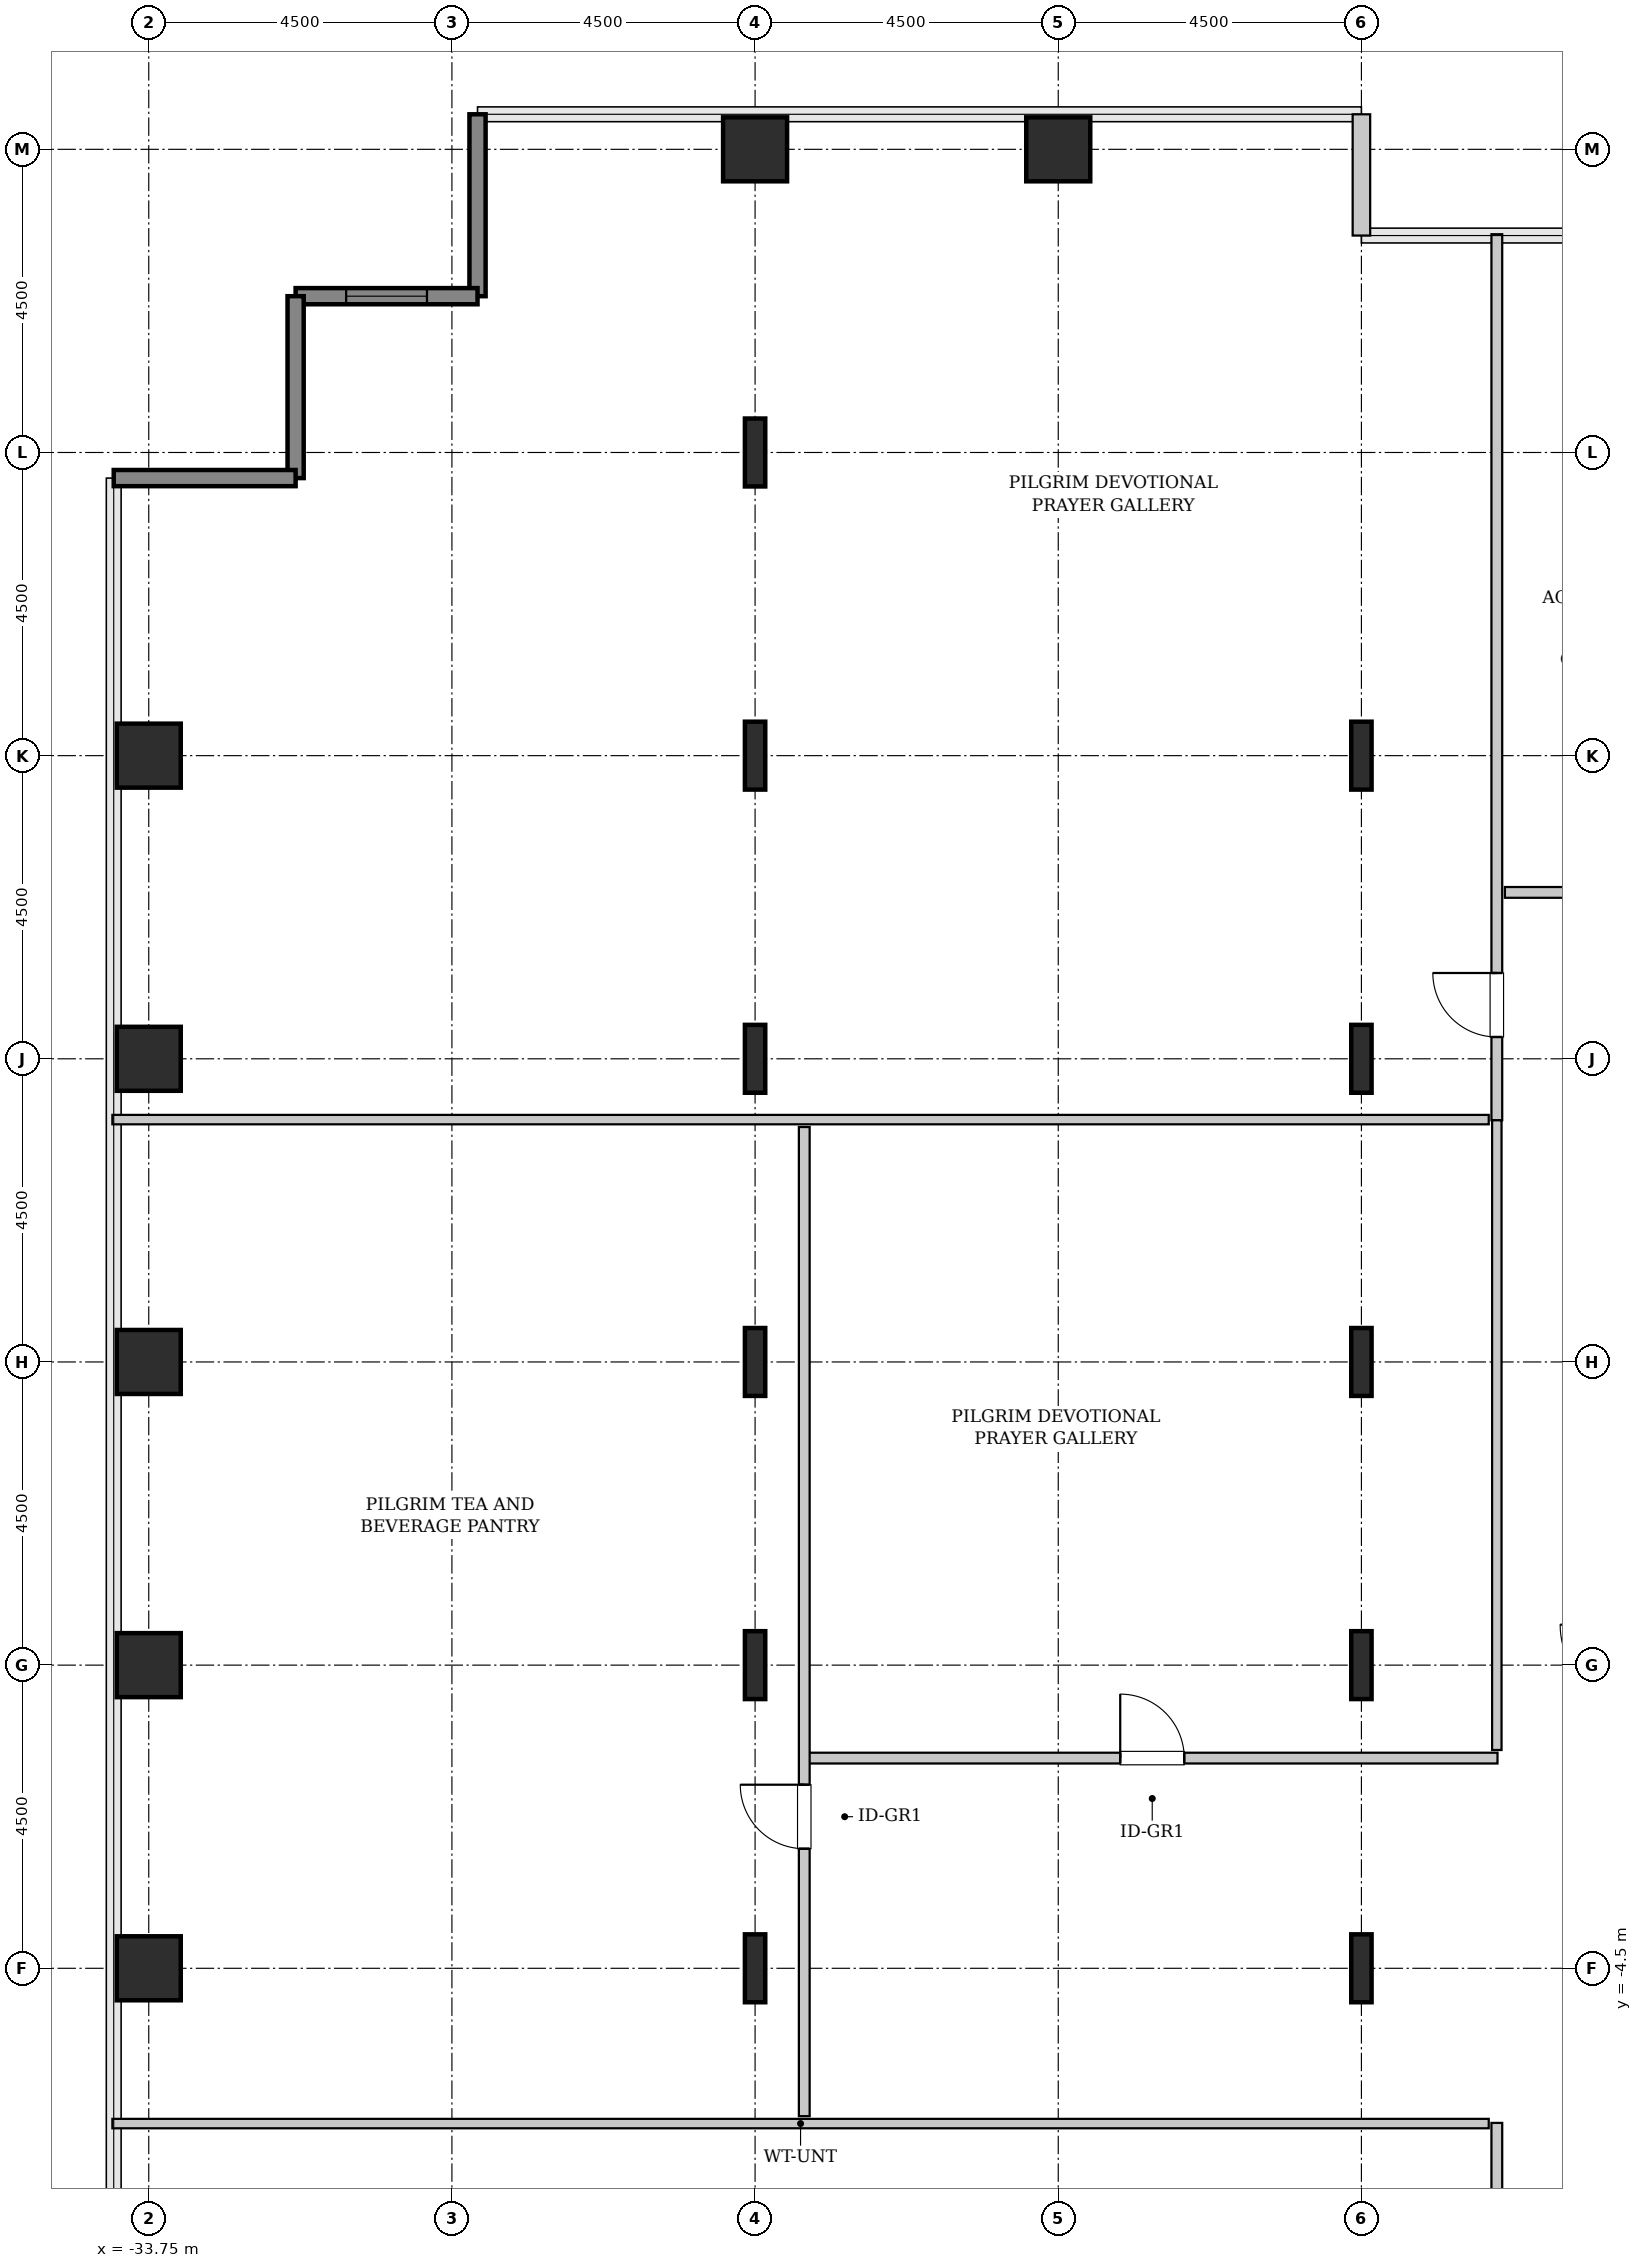
"""IFC4 building model, lengths in metres.
Left out: names, types, materials, properties, quantities, classifications, styles, units other than length and angle.
Written with IfcOpenShell. Run it as: python <this file> out.ifc"""

import sys

from ifc_helpers import new_model, si_unit, direction, frame, frame_2d, origin, origin_2d, place, context, subcontext, project, spatial, rectangle, hollow_rectangle, i_section, extrude, source, transform, mapped, element, fill, save


model = new_model("IFC4")
c1 = context("Model", 3, precision=1e-05, world=origin(), true_north=direction((0.0, 1.0)))
c2 = subcontext(c1, "Body", "Model", "MODEL_VIEW")
j1 = project(units=[si_unit("LENGTHUNIT", "METRE"), si_unit("PLANEANGLEUNIT", "RADIAN")], contexts=[c1])
p1 = place(None, origin())
s1 = spatial("IfcSite", under=j1, at=p1, CompositionType="ELEMENT")
p2 = place(p1, origin())
s2 = spatial("IfcBuilding", under=s1, at=p2, CompositionType="ELEMENT")
p3 = place(p2, frame((0.0, 0.0, 82.4)))
s3 = spatial("IfcBuildingStorey", under=s2, at=p3, CompositionType="ELEMENT", Elevation=82.4)
m1 = source(origin(), c2, "Body", "SweptSolid", [
    extrude(hollow_rectangle(XDim=0.95, YDim=0.95, WallThickness=0.045, InnerFilletRadius=0.045, OuterFilletRadius=0.09, at=origin_2d()), origin(), (0.0, 0.0, 1.0), 3.8),
])
for number, where, z_axis, x_axis in (
    (1, (-33.75, -4.5, 0.0), (0.0, 0.0, 1.0), (1.0, 0.0, 0.0)),
    (2, (-33.75, 0.0, 0.0), (0.0, 0.0, 1.0), (1.0, 0.0, 0.0)),
    (3, (-33.75, 4.5, 0.0), (0.0, 0.0, 1.0), (1.0, 0.0, 0.0)),
    (4, (-33.75, 9.0, 0.0), (0.0, 0.0, 1.0), (1.0, 0.0, 0.0)),
    (5, (-33.75, 13.5, 0.0), (0.0, 0.0, 1.0), (1.0, 0.0, 0.0)),
):
    element("IfcColumn", number, at=place(p3, frame(where, z_axis=z_axis, x_axis=x_axis)), inside=s3, PredefinedType="COLUMN", context=c2, shape_type="MappedRepresentation", body=[
        mapped(m1, transform((0.0, 0.0, 0.0), x_axis=(1.0, 0.0, 0.0), y_axis=(0.0, 1.0, 0.0), z_axis=(0.0, 0.0, 1.0), scale=1.0)),
    ])
m2 = source(origin(), c2, "Body", "SweptSolid", [
    extrude(i_section(OverallWidth=0.302, OverallDepth=1.008, WebThickness=0.021, FlangeThickness=0.04, FilletRadius=0.03, at=origin_2d()), origin(), (0.0, 0.0, 1.0), 3.8),
])
for number, where, z_axis, x_axis in (
    (6, (-24.75, -4.5, 0.0), (0.0, 0.0, 1.0), (1.0, 0.0, 0.0)),
    (7, (-24.75, 0.0, 0.0), (0.0, 0.0, 1.0), (1.0, 0.0, 0.0)),
    (8, (-24.75, 4.5, 0.0), (0.0, 0.0, 1.0), (1.0, 0.0, 0.0)),
    (9, (-24.75, 9.0, 0.0), (0.0, 0.0, 1.0), (1.0, 0.0, 0.0)),
    (10, (-24.75, 13.5, 0.0), (0.0, 0.0, 1.0), (1.0, 0.0, 0.0)),
    (11, (-24.75, 18.0, 0.0), (0.0, 0.0, 1.0), (1.0, 0.0, 0.0)),
):
    element("IfcColumn", number, at=place(p3, frame(where, z_axis=z_axis, x_axis=x_axis)), inside=s3, PredefinedType="COLUMN", context=c2, shape_type="MappedRepresentation", body=[
        mapped(m2, transform((0.0, 0.0, 0.0), x_axis=(1.0, 0.0, 0.0), y_axis=(0.0, 1.0, 0.0), z_axis=(0.0, 0.0, 1.0), scale=1.0)),
    ])
for number, where, z_axis, x_axis in (
    (12, (-24.75, 22.5, 0.0), (0.0, 0.0, 1.0), (1.0, 0.0, 0.0)),
    (13, (-20.25, 22.5, 0.0), (0.0, 0.0, 1.0), (1.0, 0.0, 0.0)),
):
    element("IfcColumn", number, at=place(p3, frame(where, z_axis=z_axis, x_axis=x_axis)), inside=s3, PredefinedType="COLUMN", context=c2, shape_type="MappedRepresentation", body=[
        mapped(m1, transform((0.0, 0.0, 0.0), x_axis=(1.0, 0.0, 0.0), y_axis=(0.0, 1.0, 0.0), z_axis=(0.0, 0.0, 1.0), scale=1.0)),
    ])
for number, where, z_axis, x_axis in (
    (14, (-15.75, -4.5, 0.0), (0.0, 0.0, 1.0), (1.0, 0.0, 0.0)),
    (15, (-15.75, 0.0, 0.0), (0.0, 0.0, 1.0), (1.0, 0.0, 0.0)),
    (16, (-15.75, 4.5, 0.0), (0.0, 0.0, 1.0), (1.0, 0.0, 0.0)),
    (17, (-15.75, 9.0, 0.0), (0.0, 0.0, 1.0), (1.0, 0.0, 0.0)),
    (18, (-15.75, 13.5, 0.0), (0.0, 0.0, 1.0), (1.0, 0.0, 0.0)),
):
    element("IfcColumn", number, at=place(p3, frame(where, z_axis=z_axis, x_axis=x_axis)), inside=s3, PredefinedType="COLUMN", context=c2, shape_type="MappedRepresentation", body=[
        mapped(m2, transform((0.0, 0.0, 0.0), x_axis=(1.0, 0.0, 0.0), y_axis=(0.0, 1.0, 0.0), z_axis=(0.0, 0.0, 1.0), scale=1.0)),
    ])
m3 = source(origin(), c2, "Body", "SweptSolid", [
    extrude(rectangle(XDim=1.8, YDim=0.26, at=frame_2d((0.9, 0.0))), origin(), (0.0, 0.0, 1.0), 3.5),
])
p4 = place(p3, frame((-15.75, 21.22, 0.0), z_axis=(0.0, 0.0, 1.0), x_axis=(0.0, 1.0, 0.0)))
e19 = element("IfcWall", 19, at=p4, inside=s3, PredefinedType="SOLIDWALL", context=c2, shape_type="MappedRepresentation", body=[
    mapped(m3, transform((0.0, 0.0, 0.0), x_axis=(1.0, 0.0, 0.0), y_axis=(0.0, 1.0, 0.0), z_axis=(0.0, 0.0, 1.0), scale=1.0)),
])
m4 = source(origin(), c2, "Body", "SweptSolid", [
    extrude(rectangle(XDim=2.7, YDim=0.24, at=frame_2d((1.35, 0.0))), origin(), (0.0, 0.0, 1.0), 3.5),
])
p5 = place(p3, frame((-28.87, 23.02, 0.0), z_axis=(0.0, 0.0, 1.0), x_axis=(0.0, -1.0, 0.0)))
e20 = element("IfcWall", 20, at=p5, inside=s3, PredefinedType="SHEAR", context=c2, shape_type="MappedRepresentation", body=[
    mapped(m4, transform((0.0, 0.0, 0.0), x_axis=(1.0, 0.0, 0.0), y_axis=(0.0, 1.0, 0.0), z_axis=(0.0, 0.0, 1.0), scale=1.0)),
])
p6 = place(p3, frame((-28.87, 20.32, 0.0), z_axis=(0.0, 0.0, 1.0), x_axis=(-1.0, 0.0, 0.0)))
e21 = element("IfcWall", 21, at=p6, inside=s3, PredefinedType="SHEAR", context=c2, shape_type="MappedRepresentation", body=[
    mapped(m4, transform((0.0, 0.0, 0.0), x_axis=(1.0, 0.0, 0.0), y_axis=(0.0, 1.0, 0.0), z_axis=(0.0, 0.0, 1.0), scale=1.0)),
])
p7 = place(p6, frame((0.75, 0.0, 0.85)))
e22 = element("IfcOpeningElement", 22, at=p7, cuts=e21, PredefinedType="OPENING", context=c2, shape_type="SweptSolid", body=[
    extrude(rectangle(XDim=1.2, YDim=1.8, at=frame_2d((0.6, 0.9))), frame((0.0, 0.13, 0.0), z_axis=(0.0, -1.0, 0.0), x_axis=(1.0, 0.0, 0.0)), (0.0, 0.0, 1.0), 0.26),
])
for number, where, z_axis, x_axis in (
    (23, (-31.57, 20.32, 0.0), (0.0, 0.0, 1.0), (0.0, -1.0, 0.0)),
    (24, (-31.57, 17.62, 0.0), (0.0, 0.0, 1.0), (-1.0, 0.0, 0.0)),
):
    element("IfcWall", number, at=place(p3, frame(where, z_axis=z_axis, x_axis=x_axis)), inside=s3, PredefinedType="SHEAR", context=c2, shape_type="MappedRepresentation", body=[
        mapped(m4, transform((0.0, 0.0, 0.0), x_axis=(1.0, 0.0, 0.0), y_axis=(0.0, 1.0, 0.0), z_axis=(0.0, 0.0, 1.0), scale=1.0)),
    ])
m5 = source(origin(), c2, "Body", "SweptSolid", [
    extrude(rectangle(XDim=14.445, YDim=0.16, at=frame_2d((7.223, 0.0))), origin(), (0.0, 0.0, 1.0), 3.485),
])
p8 = place(p3, frame((-13.74, -21.24, 0.0), z_axis=(0.0, 0.0, 1.0), x_axis=(0.0, 1.0, 0.0)))
e25 = element("IfcWall", 25, at=p8, inside=s3, PredefinedType="PARTITIONING", context=c2, shape_type="MappedRepresentation", body=[
    mapped(m5, transform((0.0, 0.0, 0.0), x_axis=(1.0, 0.0, 0.0), y_axis=(0.0, 1.0, 0.0), z_axis=(0.0, 0.0, 1.0), scale=1.0)),
])
p9 = place(p8, frame((11.613, 0.0, 0.0)))
e26 = element("IfcOpeningElement", 26, at=p9, cuts=e25, PredefinedType="OPENING", context=c2, shape_type="SweptSolid", body=[
    extrude(rectangle(XDim=0.95, YDim=2.1, at=frame_2d((0.475, 1.05))), frame((0.0, 0.09, 0.0), z_axis=(0.0, -1.0, 0.0), x_axis=(1.0, 0.0, 0.0)), (0.0, 0.0, 1.0), 0.18),
])
m6 = source(origin(), c2, "Body", "SweptSolid", [
    extrude(rectangle(XDim=20.43, YDim=0.14, at=frame_2d((10.215, 0.0))), origin(), (0.0, 0.0, 1.0), 3.485),
])
p10 = place(p3, frame((-34.29, -6.805, 0.0), z_axis=(0.0, 0.0, 1.0), x_axis=(1.0, 0.0, 0.0)))
e27 = element("IfcWall", 27, at=p10, inside=s3, PredefinedType="PARTITIONING", context=c2, shape_type="MappedRepresentation", body=[
    mapped(m6, transform((0.0, 0.0, 0.0), x_axis=(1.0, 0.0, 0.0), y_axis=(0.0, 1.0, 0.0), z_axis=(0.0, 0.0, 1.0), scale=1.0)),
])
m7 = source(origin(), c2, "Body", "SweptSolid", [
    extrude(rectangle(XDim=13.153, YDim=0.16, at=frame_2d((6.576, 0.0))), origin(), (0.0, 0.0, 1.0), 3.485),
])
p11 = place(p3, frame((-13.74, 8.087, 0.0), z_axis=(0.0, 0.0, 1.0), x_axis=(0.0, 1.0, 0.0)))
e28 = element("IfcWall", 28, at=p11, inside=s3, PredefinedType="PARTITIONING", context=c2, shape_type="MappedRepresentation", body=[
    mapped(m7, transform((0.0, 0.0, 0.0), x_axis=(1.0, 0.0, 0.0), y_axis=(0.0, 1.0, 0.0), z_axis=(0.0, 0.0, 1.0), scale=1.0)),
])
p12 = place(p11, frame((1.236, 0.0, 0.0)))
e29 = element("IfcOpeningElement", 29, at=p12, cuts=e28, PredefinedType="OPENING", context=c2, shape_type="SweptSolid", body=[
    extrude(rectangle(XDim=0.95, YDim=2.1, at=frame_2d((0.475, 1.05))), frame((0.0, 0.09, 0.0), z_axis=(0.0, -1.0, 0.0), x_axis=(1.0, 0.0, 0.0)), (0.0, 0.0, 1.0), 0.18),
])
p13 = place(p3, frame((-34.29, 8.097, 0.0), z_axis=(0.0, 0.0, 1.0), x_axis=(1.0, 0.0, 0.0)))
e30 = element("IfcWall", 30, at=p13, inside=s3, PredefinedType="PARTITIONING", context=c2, shape_type="MappedRepresentation", body=[
    mapped(m6, transform((0.0, 0.0, 0.0), x_axis=(1.0, 0.0, 0.0), y_axis=(0.0, 1.0, 0.0), z_axis=(0.0, 0.0, 1.0), scale=1.0)),
])
m8 = source(origin(), c2, "Body", "SweptSolid", [
    extrude(rectangle(XDim=10.25, YDim=0.16, at=frame_2d((5.125, 0.0))), origin(), (0.0, 0.0, 1.0), 3.485),
])
p14 = place(p3, frame((-23.98, -1.38, 0.0), z_axis=(0.0, 0.0, 1.0), x_axis=(1.0, 0.0, 0.0)))
e31 = element("IfcWall", 31, at=p14, inside=s3, PredefinedType="PARTITIONING", context=c2, shape_type="MappedRepresentation", body=[
    mapped(m8, transform((0.0, 0.0, 0.0), x_axis=(1.0, 0.0, 0.0), y_axis=(0.0, 1.0, 0.0), z_axis=(0.0, 0.0, 1.0), scale=1.0)),
])
p15 = place(p14, frame((4.65, 0.0, 0.0)))
e32 = element("IfcOpeningElement", 32, at=p15, cuts=e31, PredefinedType="OPENING", context=c2, shape_type="SweptSolid", body=[
    extrude(rectangle(XDim=0.95, YDim=2.1, at=frame_2d((0.475, 1.05))), frame((0.0, 0.09, 0.0), z_axis=(0.0, -1.0, 0.0), x_axis=(1.0, 0.0, 0.0)), (0.0, 0.0, 1.0), 0.18),
])
m9 = source(origin(), c2, "Body", "SweptSolid", [
    extrude(rectangle(XDim=9.347, YDim=0.14, at=frame_2d((4.674, 0.0))), origin(), (0.0, 0.0, 1.0), 3.485),
])
p16 = place(p3, frame((-13.74, -1.26, 0.0), z_axis=(0.0, 0.0, 1.0), x_axis=(0.0, 1.0, 0.0)))
e33 = element("IfcWall", 33, at=p16, inside=s3, PredefinedType="PARTITIONING", context=c2, shape_type="MappedRepresentation", body=[
    mapped(m9, transform((0.0, 0.0, 0.0), x_axis=(1.0, 0.0, 0.0), y_axis=(0.0, 1.0, 0.0), z_axis=(0.0, 0.0, 1.0), scale=1.0)),
])
m10 = source(origin(), c2, "Body", "SweptSolid", [
    extrude(rectangle(XDim=14.683, YDim=0.16, at=frame_2d((7.341, 0.0))), origin(), (0.0, 0.0, 1.0), 3.485),
])
p17 = place(p3, frame((-24.02, -6.695, 0.0), z_axis=(0.0, 0.0, 1.0), x_axis=(0.0, 1.0, 0.0)))
e34 = element("IfcWall", 34, at=p17, inside=s3, PredefinedType="PARTITIONING", context=c2, shape_type="MappedRepresentation", body=[
    mapped(m10, transform((0.0, 0.0, 0.0), x_axis=(1.0, 0.0, 0.0), y_axis=(0.0, 1.0, 0.0), z_axis=(0.0, 0.0, 1.0), scale=1.0)),
])
p18 = place(p17, frame((3.97, 0.0, 0.0)))
e35 = element("IfcOpeningElement", 35, at=p18, cuts=e34, PredefinedType="OPENING", context=c2, shape_type="SweptSolid", body=[
    extrude(rectangle(XDim=0.95, YDim=2.1, at=frame_2d((0.475, 1.05))), frame((0.0, 0.09, 0.0), z_axis=(0.0, -1.0, 0.0), x_axis=(1.0, 0.0, 0.0)), (0.0, 0.0, 1.0), 0.18),
])
m11 = source(origin(), c2, "Body", "SweptSolid", [
    extrude(rectangle(XDim=4.125, YDim=0.16, at=frame_2d((2.062, 0.0))), origin(), (0.0, 0.0, 1.0), 3.485),
])
p19 = place(p3, frame((-13.62, 11.47, 0.0), z_axis=(0.0, 0.0, 1.0), x_axis=(1.0, 0.0, 0.0)))
e36 = element("IfcWall", 36, at=p19, inside=s3, PredefinedType="PARTITIONING", context=c2, shape_type="MappedRepresentation", body=[
    mapped(m11, transform((0.0, 0.0, 0.0), x_axis=(1.0, 0.0, 0.0), y_axis=(0.0, 1.0, 0.0), z_axis=(0.0, 0.0, 1.0), scale=1.0)),
])
p20 = place(p19, frame((1.587, 0.0, 0.0)))
e37 = element("IfcOpeningElement", 37, at=p20, cuts=e36, PredefinedType="OPENING", context=c2, shape_type="SweptSolid", body=[
    extrude(rectangle(XDim=0.95, YDim=2.1, at=frame_2d((0.475, 1.05))), frame((0.0, 0.09, 0.0), z_axis=(0.0, -1.0, 0.0), x_axis=(1.0, 0.0, 0.0)), (0.0, 0.0, 1.0), 0.18),
])
m12 = source(origin(), c2, "Body", "SweptSolid", [
    extrude(rectangle(XDim=1.2, YDim=1.8, at=frame_2d((0.6, 0.9))), frame((0.0, 0.03, 0.0), z_axis=(0.0, -1.0, 0.0), x_axis=(1.0, 0.0, 0.0)), (0.0, 0.0, 1.0), 0.06),
])
p21 = place(p7, origin())
e38 = element("IfcWindow", 38, at=p21, inside=s3, PartitioningType="SINGLE_PANEL", PredefinedType="WINDOW", context=c2, shape_type="MappedRepresentation", body=[
    mapped(m12, transform((0.0, 0.0, 0.0), x_axis=(1.0, 0.0, 0.0), y_axis=(0.0, 1.0, 0.0), z_axis=(0.0, 0.0, 1.0), scale=1.0)),
])
fill(e22, e38)
m13 = source(origin(), c2, "Body", "SweptSolid", [
    extrude(rectangle(XDim=0.95, YDim=2.1, at=frame_2d((0.475, 1.05))), frame((0.0, 0.025, 0.0), z_axis=(0.0, -1.0, 0.0), x_axis=(1.0, 0.0, 0.0)), (0.0, 0.0, 1.0), 0.05),
])
p22 = place(p12, origin())
e39 = element("IfcDoor", 39, at=p22, inside=s3, OperationType="SINGLE_SWING_RIGHT", PredefinedType="DOOR", context=c2, shape_type="MappedRepresentation", body=[
    mapped(m13, transform((0.0, 0.0, 0.0), x_axis=(1.0, 0.0, 0.0), y_axis=(0.0, 1.0, 0.0), z_axis=(0.0, 0.0, 1.0), scale=1.0)),
])
fill(e29, e39)
p23 = place(p15, origin())
e40 = element("IfcDoor", 40, at=p23, inside=s3, OperationType="SINGLE_SWING_LEFT", PredefinedType="DOOR", context=c2, shape_type="MappedRepresentation", body=[
    mapped(m13, transform((0.0, 0.0, 0.0), x_axis=(1.0, 0.0, 0.0), y_axis=(0.0, 1.0, 0.0), z_axis=(0.0, 0.0, 1.0), scale=1.0)),
])
fill(e32, e40)
p24 = place(p18, origin())
e41 = element("IfcDoor", 41, at=p24, inside=s3, OperationType="SINGLE_SWING_RIGHT", PredefinedType="DOOR", context=c2, shape_type="MappedRepresentation", body=[
    mapped(m13, transform((0.0, 0.0, 0.0), x_axis=(1.0, 0.0, 0.0), y_axis=(0.0, 1.0, 0.0), z_axis=(0.0, 0.0, 1.0), scale=1.0)),
])
fill(e35, e41)
save(model, sys.argv[1])
